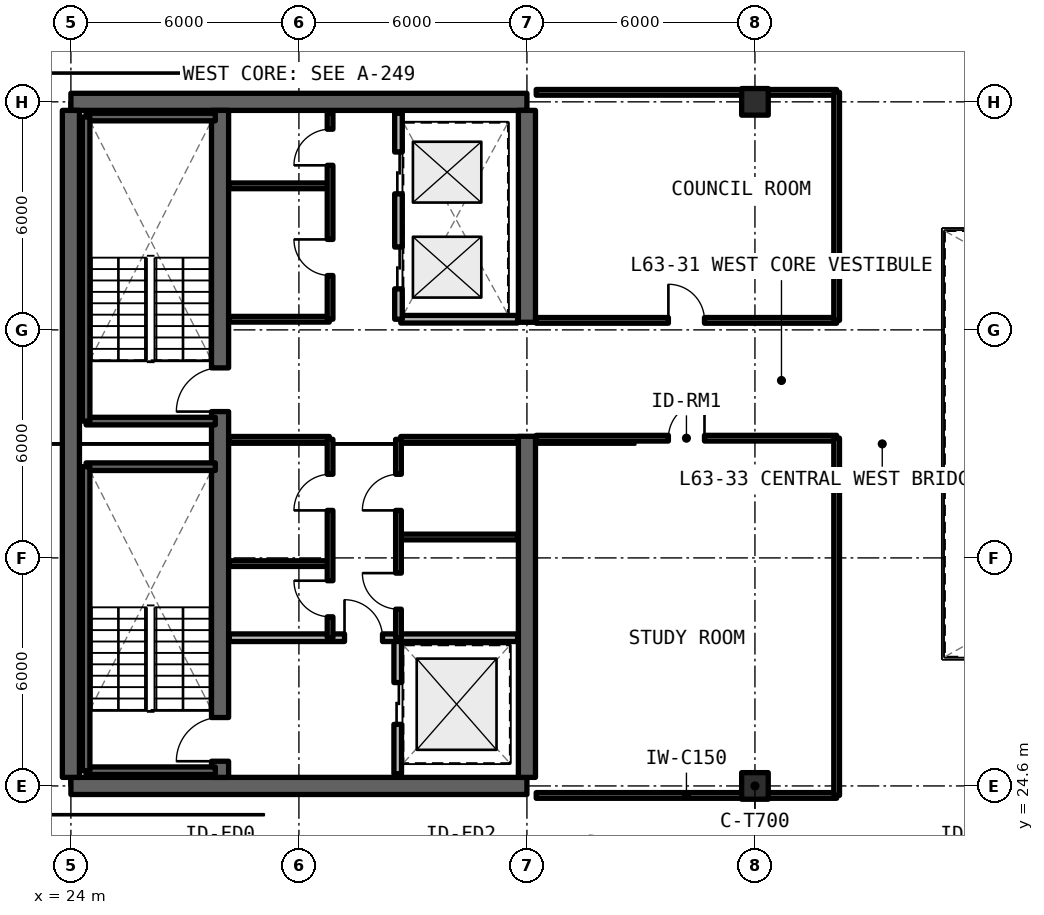
"""IFC4 building model, lengths in metres.
Left out: names, types, materials, properties, quantities, classifications, styles, units other than length and angle.
Written with IfcOpenShell. Run it as: python <this file> out.ifc"""

import sys

from ifc_helpers import new_model, si_unit, direction, frame, frame_2d, origin, origin_2d, place, context, subcontext, project, spatial, rectangle, extrude, element, fill, save


model = new_model("IFC4")
c1 = context("Model", 3, precision=1e-05, world=origin(), true_north=direction((0.0, 1.0)))
c2 = subcontext(c1, "Body", "Model", "MODEL_VIEW")
j1 = project(units=[si_unit("LENGTHUNIT", "METRE"), si_unit("PLANEANGLEUNIT", "RADIAN")], contexts=[c1])
p1 = place(None, origin())
s1 = spatial("IfcSite", under=j1, at=p1, CompositionType="ELEMENT")
p2 = place(p1, origin())
s2 = spatial("IfcBuilding", under=s1, at=p2, CompositionType="ELEMENT")
p3 = place(p2, frame((0.0, 0.0, 226.05)))
s3 = spatial("IfcBuildingStorey", under=s2, at=p3, CompositionType="ELEMENT", Elevation=226.05)
for number, where, z_axis, x_axis in (
    (1, (24.0, 24.6, 0.0), (0.0, 0.0, 1.0), (1.0, 0.0, 0.0)),
    (2, (36.0, 42.6, 0.0), (0.0, 0.0, 1.0), (-1.0, 0.0, 0.0)),
):
    element("IfcWall", number, at=place(p3, frame(where, z_axis=z_axis, x_axis=x_axis)), inside=s3, PredefinedType="SHEAR", context=c2, shape_type="SweptSolid", body=[
        extrude(rectangle(XDim=12.0, YDim=0.45, at=frame_2d((6.0, 0.0))), origin(), (0.0, 0.0, 1.0), 3.3),
    ])
p4 = place(p3, frame((24.0, 24.825, 0.0), z_axis=(0.0, 0.0, 1.0), x_axis=(0.0, 1.0, 0.0)))
e3 = element("IfcWall", 3, at=p4, inside=s3, PredefinedType="SHEAR", context=c2, shape_type="SweptSolid", body=[
    extrude(rectangle(XDim=17.55, YDim=0.45, at=frame_2d((8.775, 0.0))), origin(), (0.0, 0.0, 1.0), 3.3),
])
p5 = place(p3, frame((36.0, 24.825, 0.0), z_axis=(0.0, 0.0, 1.0), x_axis=(0.0, 1.0, 0.0)))
e4 = element("IfcWall", 4, at=p5, inside=s3, PredefinedType="SHEAR", context=c2, shape_type="SweptSolid", body=[
    extrude(rectangle(XDim=8.975, YDim=0.45, at=frame_2d((4.488, 0.0))), origin(), (0.0, 0.0, 1.0), 3.3),
])
p6 = place(p3, frame((36.0, 36.8, 0.0), z_axis=(0.0, 0.0, 1.0), x_axis=(0.0, 1.0, 0.0)))
e5 = element("IfcWall", 5, at=p6, inside=s3, PredefinedType="SHEAR", context=c2, shape_type="SweptSolid", body=[
    extrude(rectangle(XDim=5.575, YDim=0.45, at=frame_2d((2.788, 0.0))), origin(), (0.0, 0.0, 1.0), 3.3),
])
p7 = place(p3, frame((27.925, 24.825, 0.0), z_axis=(0.0, 0.0, 1.0), x_axis=(0.0, 1.0, 0.0)))
e6 = element("IfcWall", 6, at=p7, inside=s3, PredefinedType="SHEAR", context=c2, shape_type="SweptSolid", body=[
    extrude(rectangle(XDim=17.55, YDim=0.45, at=frame_2d((8.775, 0.0))), origin(), (0.0, 0.0, 1.0), 3.3),
])
p8 = place(p7, frame((0.425, 0.0, 0.0)))
e7 = element("IfcOpeningElement", 7, at=p8, cuts=e6, PredefinedType="OPENING", context=c2, shape_type="SweptSolid", body=[
    extrude(rectangle(XDim=1.15, YDim=2.15, at=frame_2d((0.575, 1.075))), frame((0.0, 0.235, 0.0), z_axis=(0.0, -1.0, 0.0), x_axis=(1.0, 0.0, 0.0)), (0.0, 0.0, 1.0), 0.47),
])
p9 = place(p7, frame((9.625, 0.0, 0.0)))
e8 = element("IfcOpeningElement", 8, at=p9, cuts=e6, PredefinedType="OPENING", context=c2, shape_type="SweptSolid", body=[
    extrude(rectangle(XDim=1.15, YDim=2.15, at=frame_2d((0.575, 1.075))), frame((0.0, 0.235, 0.0), z_axis=(0.0, -1.0, 0.0), x_axis=(1.0, 0.0, 0.0)), (0.0, 0.0, 1.0), 0.47),
])
for number, where, z_axis, x_axis in (
    (9, (42.0, 24.6, 0.0), (0.0, 0.0, 1.0), (1.0, 0.0, 0.0)),
    (10, (42.0, 42.6, 0.0), (0.0, 0.0, 1.0), (1.0, 0.0, 0.0)),
):
    element("IfcColumn", number, at=place(p3, frame(where, z_axis=z_axis, x_axis=x_axis)), inside=s3, PredefinedType="COLUMN", context=c2, shape_type="SweptSolid", body=[
        extrude(rectangle(XDim=0.7, YDim=0.7, at=origin_2d()), origin(), (0.0, 0.0, 1.0), 3.02),
    ])
p10 = place(p3, frame((32.6, 24.92, 0.0), z_axis=(0.0, 0.0, 1.0), x_axis=(0.0, 1.0, 0.0)))
e11 = element("IfcWall", 11, at=p10, inside=s3, PredefinedType="SOLIDWALL", context=c2, shape_type="SweptSolid", body=[
    extrude(rectangle(XDim=3.58, YDim=0.2, at=frame_2d((1.79, 0.0))), origin(), (0.0, 0.0, 1.0), 2.35),
])
p11 = place(p10, frame((1.3, 0.0, 0.0)))
e12 = element("IfcOpeningElement", 12, at=p11, cuts=e11, PredefinedType="OPENING", context=c2, shape_type="SweptSolid", body=[
    extrude(rectangle(XDim=1.1, YDim=2.2, at=frame_2d((0.55, 1.1))), frame((0.0, 0.11, 0.0), z_axis=(0.0, -1.0, 0.0), x_axis=(1.0, 0.0, 0.0)), (0.0, 0.0, 1.0), 0.22),
])
p12 = place(p3, frame((28.17, 28.5, 0.0), z_axis=(0.0, 0.0, 1.0), x_axis=(1.0, 0.0, 0.0)))
e13 = element("IfcWall", 13, at=p12, inside=s3, PredefinedType="SOLIDWALL", context=c2, shape_type="SweptSolid", body=[
    extrude(rectangle(XDim=7.585, YDim=0.2, at=frame_2d((3.792, 0.0))), origin(), (0.0, 0.0, 1.0), 2.35),
])
p13 = place(p12, frame((3.03, 0.0, 0.0)))
e14 = element("IfcOpeningElement", 14, at=p13, cuts=e13, PredefinedType="OPENING", context=c2, shape_type="SweptSolid", body=[
    extrude(rectangle(XDim=1.0, YDim=2.15, at=frame_2d((0.5, 1.075))), frame((0.0, 0.11, 0.0), z_axis=(0.0, -1.0, 0.0), x_axis=(1.0, 0.0, 0.0)), (0.0, 0.0, 1.0), 0.22),
])
for number, where, z_axis, x_axis in (
    (15, (28.17, 30.45, 0.0), (0.0, 0.0, 1.0), (1.0, 0.0, 0.0)),
    (16, (28.17, 33.72, 0.0), (0.0, 0.0, 1.0), (1.0, 0.0, 0.0)),
):
    element("IfcWall", number, at=place(p3, frame(where, z_axis=z_axis, x_axis=x_axis)), inside=s3, PredefinedType="SOLIDWALL", context=c2, shape_type="SweptSolid", body=[
        extrude(rectangle(XDim=2.63, YDim=0.15, at=frame_2d((1.315, 0.0))), origin(), (0.0, 0.0, 1.0), 2.35),
    ])
p14 = place(p3, frame((30.82, 28.5, 0.0), z_axis=(0.0, 0.0, 1.0), x_axis=(0.0, 1.0, 0.0)))
e17 = element("IfcWall", 17, at=p14, inside=s3, PredefinedType="SOLIDWALL", context=c2, shape_type="SweptSolid", body=[
    extrude(rectangle(XDim=5.22, YDim=0.15, at=frame_2d((2.61, 0.0))), origin(), (0.0, 0.0, 1.0), 2.35),
])
p15 = place(p14, frame((0.55, 0.0, 0.0)))
e18 = element("IfcOpeningElement", 18, at=p15, cuts=e17, PredefinedType="OPENING", context=c2, shape_type="SweptSolid", body=[
    extrude(rectangle(XDim=0.95, YDim=2.15, at=frame_2d((0.475, 1.075))), frame((0.0, 0.085, 0.0), z_axis=(0.0, -1.0, 0.0), x_axis=(1.0, 0.0, 0.0)), (0.0, 0.0, 1.0), 0.17),
])
p16 = place(p14, frame((3.35, 0.0, 0.0)))
e19 = element("IfcOpeningElement", 19, at=p16, cuts=e17, PredefinedType="OPENING", context=c2, shape_type="SweptSolid", body=[
    extrude(rectangle(XDim=0.95, YDim=2.15, at=frame_2d((0.475, 1.075))), frame((0.0, 0.085, 0.0), z_axis=(0.0, -1.0, 0.0), x_axis=(1.0, 0.0, 0.0)), (0.0, 0.0, 1.0), 0.17),
])
for number, where, z_axis, x_axis in (
    (20, (32.68, 31.15, 0.0), (0.0, 0.0, 1.0), (1.0, 0.0, 0.0)),
    (21, (32.68, 33.72, 0.0), (0.0, 0.0, 1.0), (1.0, 0.0, 0.0)),
):
    element("IfcWall", number, at=place(p3, frame(where, z_axis=z_axis, x_axis=x_axis)), inside=s3, PredefinedType="SOLIDWALL", context=c2, shape_type="SweptSolid", body=[
        extrude(rectangle(XDim=3.075, YDim=0.15, at=frame_2d((1.538, 0.0))), origin(), (0.0, 0.0, 1.0), 2.35),
    ])
p17 = place(p3, frame((32.62, 28.5, 0.0), z_axis=(0.0, 0.0, 1.0), x_axis=(0.0, 1.0, 0.0)))
e22 = element("IfcWall", 22, at=p17, inside=s3, PredefinedType="SOLIDWALL", context=c2, shape_type="SweptSolid", body=[
    extrude(rectangle(XDim=5.22, YDim=0.15, at=frame_2d((2.61, 0.0))), origin(), (0.0, 0.0, 1.0), 2.35),
])
p18 = place(p17, frame((0.75, 0.0, 0.0)))
e23 = element("IfcOpeningElement", 23, at=p18, cuts=e22, PredefinedType="OPENING", context=c2, shape_type="SweptSolid", body=[
    extrude(rectangle(XDim=0.95, YDim=2.15, at=frame_2d((0.475, 1.075))), frame((0.0, 0.085, 0.0), z_axis=(0.0, -1.0, 0.0), x_axis=(1.0, 0.0, 0.0)), (0.0, 0.0, 1.0), 0.17),
])
p19 = place(p17, frame((3.35, 0.0, 0.0)))
e24 = element("IfcOpeningElement", 24, at=p19, cuts=e22, PredefinedType="OPENING", context=c2, shape_type="SweptSolid", body=[
    extrude(rectangle(XDim=0.95, YDim=2.15, at=frame_2d((0.475, 1.075))), frame((0.0, 0.085, 0.0), z_axis=(0.0, -1.0, 0.0), x_axis=(1.0, 0.0, 0.0)), (0.0, 0.0, 1.0), 0.17),
])
for number, where, z_axis, x_axis in (
    (25, (28.17, 36.88, 0.0), (0.0, 0.0, 1.0), (1.0, 0.0, 0.0)),
    (26, (28.17, 40.39, 0.0), (0.0, 0.0, 1.0), (1.0, 0.0, 0.0)),
):
    element("IfcWall", number, at=place(p3, frame(where, z_axis=z_axis, x_axis=x_axis)), inside=s3, PredefinedType="SOLIDWALL", context=c2, shape_type="SweptSolid", body=[
        extrude(rectangle(XDim=2.63, YDim=0.15, at=frame_2d((1.315, 0.0))), origin(), (0.0, 0.0, 1.0), 2.35),
    ])
p20 = place(p3, frame((30.82, 36.88, 0.0), z_axis=(0.0, 0.0, 1.0), x_axis=(0.0, 1.0, 0.0)))
e27 = element("IfcWall", 27, at=p20, inside=s3, PredefinedType="SOLIDWALL", context=c2, shape_type="SweptSolid", body=[
    extrude(rectangle(XDim=5.42, YDim=0.15, at=frame_2d((2.71, 0.0))), origin(), (0.0, 0.0, 1.0), 2.35),
])
p21 = place(p20, frame((1.15, 0.0, 0.0)))
e28 = element("IfcOpeningElement", 28, at=p21, cuts=e27, PredefinedType="OPENING", context=c2, shape_type="SweptSolid", body=[
    extrude(rectangle(XDim=0.95, YDim=2.15, at=frame_2d((0.475, 1.075))), frame((0.0, 0.085, 0.0), z_axis=(0.0, -1.0, 0.0), x_axis=(1.0, 0.0, 0.0)), (0.0, 0.0, 1.0), 0.17),
])
p22 = place(p20, frame((4.05, 0.0, 0.0)))
e29 = element("IfcOpeningElement", 29, at=p22, cuts=e27, PredefinedType="OPENING", context=c2, shape_type="SweptSolid", body=[
    extrude(rectangle(XDim=0.95, YDim=2.15, at=frame_2d((0.475, 1.075))), frame((0.0, 0.085, 0.0), z_axis=(0.0, -1.0, 0.0), x_axis=(1.0, 0.0, 0.0)), (0.0, 0.0, 1.0), 0.17),
])
p23 = place(p3, frame((32.68, 36.88, 0.0), z_axis=(0.0, 0.0, 1.0), x_axis=(1.0, 0.0, 0.0)))
e30 = element("IfcWall", 30, at=p23, inside=s3, PredefinedType="SOLIDWALL", context=c2, shape_type="SweptSolid", body=[
    extrude(rectangle(XDim=3.075, YDim=0.2, at=frame_2d((1.538, 0.0))), origin(), (0.0, 0.0, 1.0), 2.35),
])
p24 = place(p3, frame((32.62, 36.88, 0.0), z_axis=(0.0, 0.0, 1.0), x_axis=(0.0, 1.0, 0.0)))
e31 = element("IfcWall", 31, at=p24, inside=s3, PredefinedType="SOLIDWALL", context=c2, shape_type="SweptSolid", body=[
    extrude(rectangle(XDim=5.42, YDim=0.2, at=frame_2d((2.71, 0.0))), origin(), (0.0, 0.0, 1.0), 2.35),
])
p25 = place(p24, frame((0.8, 0.0, 0.0)))
e32 = element("IfcOpeningElement", 32, at=p25, cuts=e31, PredefinedType="OPENING", context=c2, shape_type="SweptSolid", body=[
    extrude(rectangle(XDim=1.1, YDim=2.2, at=frame_2d((0.55, 1.1))), frame((0.0, 0.11, 0.0), z_axis=(0.0, -1.0, 0.0), x_axis=(1.0, 0.0, 0.0)), (0.0, 0.0, 1.0), 0.22),
])
p26 = place(p24, frame((3.3, 0.0, 0.0)))
e33 = element("IfcOpeningElement", 33, at=p26, cuts=e31, PredefinedType="OPENING", context=c2, shape_type="SweptSolid", body=[
    extrude(rectangle(XDim=1.1, YDim=2.2, at=frame_2d((0.55, 1.1))), frame((0.0, 0.11, 0.0), z_axis=(0.0, -1.0, 0.0), x_axis=(1.0, 0.0, 0.0)), (0.0, 0.0, 1.0), 0.22),
])
p27 = place(p3, frame((36.245, 24.35, 0.0), z_axis=(0.0, 0.0, 1.0), x_axis=(1.0, 0.0, 0.0)))
e34 = element("IfcWall", 34, at=p27, inside=s3, PredefinedType="SOLIDWALL", context=c2, shape_type="SweptSolid", body=[
    extrude(rectangle(XDim=7.905, YDim=0.15, at=frame_2d((3.952, 0.0))), origin(), (0.0, 0.0, 1.0), 2.35),
])
p28 = place(p3, frame((36.245, 33.75, 0.0), z_axis=(0.0, 0.0, 1.0), x_axis=(1.0, 0.0, 0.0)))
e35 = element("IfcWall", 35, at=p28, inside=s3, PredefinedType="SOLIDWALL", context=c2, shape_type="SweptSolid", body=[
    extrude(rectangle(XDim=7.905, YDim=0.15, at=frame_2d((3.952, 0.0))), origin(), (0.0, 0.0, 1.0), 2.35),
])
p29 = place(p28, frame((3.478, 0.0, 0.0)))
e36 = element("IfcOpeningElement", 36, at=p29, cuts=e35, PredefinedType="OPENING", context=c2, shape_type="SweptSolid", body=[
    extrude(rectangle(XDim=0.95, YDim=2.15, at=frame_2d((0.475, 1.075))), frame((0.0, 0.085, 0.0), z_axis=(0.0, -1.0, 0.0), x_axis=(1.0, 0.0, 0.0)), (0.0, 0.0, 1.0), 0.17),
])
p30 = place(p3, frame((44.15, 24.35, 0.0), z_axis=(0.0, 0.0, 1.0), x_axis=(0.0, 1.0, 0.0)))
e37 = element("IfcWall", 37, at=p30, inside=s3, PredefinedType="SOLIDWALL", context=c2, shape_type="SweptSolid", body=[
    extrude(rectangle(XDim=9.4, YDim=0.15, at=frame_2d((4.7, 0.0))), origin(), (0.0, 0.0, 1.0), 2.35),
])
p31 = place(p3, frame((36.245, 36.85, 0.0), z_axis=(0.0, 0.0, 1.0), x_axis=(1.0, 0.0, 0.0)))
e38 = element("IfcWall", 38, at=p31, inside=s3, PredefinedType="SOLIDWALL", context=c2, shape_type="SweptSolid", body=[
    extrude(rectangle(XDim=7.905, YDim=0.15, at=frame_2d((3.952, 0.0))), origin(), (0.0, 0.0, 1.0), 2.35),
])
p32 = place(p31, frame((3.478, 0.0, 0.0)))
e39 = element("IfcOpeningElement", 39, at=p32, cuts=e38, PredefinedType="OPENING", context=c2, shape_type="SweptSolid", body=[
    extrude(rectangle(XDim=0.95, YDim=2.15, at=frame_2d((0.475, 1.075))), frame((0.0, 0.085, 0.0), z_axis=(0.0, -1.0, 0.0), x_axis=(1.0, 0.0, 0.0)), (0.0, 0.0, 1.0), 0.17),
])
p33 = place(p3, frame((36.245, 42.85, 0.0), z_axis=(0.0, 0.0, 1.0), x_axis=(1.0, 0.0, 0.0)))
e40 = element("IfcWall", 40, at=p33, inside=s3, PredefinedType="SOLIDWALL", context=c2, shape_type="SweptSolid", body=[
    extrude(rectangle(XDim=7.905, YDim=0.15, at=frame_2d((3.952, 0.0))), origin(), (0.0, 0.0, 1.0), 2.35),
])
p34 = place(p3, frame((44.15, 36.85, 0.0), z_axis=(0.0, 0.0, 1.0), x_axis=(0.0, 1.0, 0.0)))
e41 = element("IfcWall", 41, at=p34, inside=s3, PredefinedType="SOLIDWALL", context=c2, shape_type="SweptSolid", body=[
    extrude(rectangle(XDim=6.0, YDim=0.15, at=frame_2d((3.0, 0.0))), origin(), (0.0, 0.0, 1.0), 2.35),
])
for number, where, z_axis, x_axis in (
    (42, (24.4, 25.0, 0.0), (0.0, 0.0, 1.0), (1.0, 0.0, 0.0)),
    (43, (27.8, 33.0, 0.0), (0.0, 0.0, 1.0), (-1.0, 0.0, 0.0)),
):
    element("IfcWall", number, at=place(p3, frame(where, z_axis=z_axis, x_axis=x_axis)), inside=s3, PredefinedType="SOLIDWALL", context=c2, shape_type="SweptSolid", body=[
        extrude(rectangle(XDim=3.4, YDim=0.2, at=frame_2d((1.7, 0.0))), origin(), (0.0, 0.0, 1.0), 3.3),
    ])
p35 = place(p3, frame((24.4, 33.0, 0.0), z_axis=(0.0, 0.0, 1.0), x_axis=(0.0, -1.0, 0.0)))
e44 = element("IfcWall", 44, at=p35, inside=s3, PredefinedType="SOLIDWALL", context=c2, shape_type="SweptSolid", body=[
    extrude(rectangle(XDim=8.0, YDim=0.2, at=frame_2d((4.0, 0.0))), origin(), (0.0, 0.0, 1.0), 3.3),
])
for number, where, z_axis, x_axis in (
    (45, (24.4, 34.2, 0.0), (0.0, 0.0, 1.0), (1.0, 0.0, 0.0)),
    (46, (27.8, 42.2, 0.0), (0.0, 0.0, 1.0), (-1.0, 0.0, 0.0)),
):
    element("IfcWall", number, at=place(p3, frame(where, z_axis=z_axis, x_axis=x_axis)), inside=s3, PredefinedType="SOLIDWALL", context=c2, shape_type="SweptSolid", body=[
        extrude(rectangle(XDim=3.4, YDim=0.2, at=frame_2d((1.7, 0.0))), origin(), (0.0, 0.0, 1.0), 3.3),
    ])
p36 = place(p3, frame((24.4, 42.2, 0.0), z_axis=(0.0, 0.0, 1.0), x_axis=(0.0, -1.0, 0.0)))
e47 = element("IfcWall", 47, at=p36, inside=s3, PredefinedType="SOLIDWALL", context=c2, shape_type="SweptSolid", body=[
    extrude(rectangle(XDim=8.0, YDim=0.2, at=frame_2d((4.0, 0.0))), origin(), (0.0, 0.0, 1.0), 3.3),
])
p37 = place(p11, origin())
e48 = element("IfcDoor", 48, at=p37, inside=s3, OperationType="SLIDING_TO_LEFT", PredefinedType="DOOR", context=c2, shape_type="SweptSolid", body=[
    extrude(rectangle(XDim=1.1, YDim=2.2, at=frame_2d((0.55, 1.1))), frame((0.0, 0.025, 0.0), z_axis=(0.0, -1.0, 0.0), x_axis=(1.0, 0.0, 0.0)), (0.0, 0.0, 1.0), 0.05),
])
fill(e12, e48)
p38 = place(p13, origin())
e49 = element("IfcDoor", 49, at=p38, inside=s3, OperationType="SINGLE_SWING_LEFT", PredefinedType="DOOR", context=c2, shape_type="SweptSolid", body=[
    extrude(rectangle(XDim=1.0, YDim=2.15, at=frame_2d((0.5, 1.075))), frame((0.0, 0.025, 0.0), z_axis=(0.0, -1.0, 0.0), x_axis=(1.0, 0.0, 0.0)), (0.0, 0.0, 1.0), 0.05),
])
fill(e14, e49)
p39 = place(p15, origin())
e50 = element("IfcDoor", 50, at=p39, inside=s3, OperationType="SINGLE_SWING_RIGHT", PredefinedType="DOOR", context=c2, shape_type="SweptSolid", body=[
    extrude(rectangle(XDim=0.95, YDim=2.15, at=frame_2d((0.475, 1.075))), frame((0.0, 0.025, 0.0), z_axis=(0.0, -1.0, 0.0), x_axis=(1.0, 0.0, 0.0)), (0.0, 0.0, 1.0), 0.05),
])
fill(e18, e50)
p40 = place(p16, origin())
e51 = element("IfcDoor", 51, at=p40, inside=s3, OperationType="SINGLE_SWING_LEFT", PredefinedType="DOOR", context=c2, shape_type="SweptSolid", body=[
    extrude(rectangle(XDim=0.95, YDim=2.15, at=frame_2d((0.475, 1.075))), frame((0.0, 0.025, 0.0), z_axis=(0.0, -1.0, 0.0), x_axis=(1.0, 0.0, 0.0)), (0.0, 0.0, 1.0), 0.05),
])
fill(e19, e51)
p41 = place(p18, origin())
e52 = element("IfcDoor", 52, at=p41, inside=s3, OperationType="SINGLE_SWING_RIGHT", PredefinedType="DOOR", context=c2, shape_type="SweptSolid", body=[
    extrude(rectangle(XDim=0.95, YDim=2.15, at=frame_2d((0.475, 1.075))), frame((0.0, 0.025, 0.0), z_axis=(0.0, -1.0, 0.0), x_axis=(1.0, 0.0, 0.0)), (0.0, 0.0, 1.0), 0.05),
])
fill(e23, e52)
p42 = place(p19, origin())
e53 = element("IfcDoor", 53, at=p42, inside=s3, OperationType="SINGLE_SWING_LEFT", PredefinedType="DOOR", context=c2, shape_type="SweptSolid", body=[
    extrude(rectangle(XDim=0.95, YDim=2.15, at=frame_2d((0.475, 1.075))), frame((0.0, 0.025, 0.0), z_axis=(0.0, -1.0, 0.0), x_axis=(1.0, 0.0, 0.0)), (0.0, 0.0, 1.0), 0.05),
])
fill(e24, e53)
p43 = place(p21, origin())
e54 = element("IfcDoor", 54, at=p43, inside=s3, OperationType="SINGLE_SWING_RIGHT", PredefinedType="DOOR", context=c2, shape_type="SweptSolid", body=[
    extrude(rectangle(XDim=0.95, YDim=2.15, at=frame_2d((0.475, 1.075))), frame((0.0, 0.025, 0.0), z_axis=(0.0, -1.0, 0.0), x_axis=(1.0, 0.0, 0.0)), (0.0, 0.0, 1.0), 0.05),
])
fill(e28, e54)
p44 = place(p22, origin())
e55 = element("IfcDoor", 55, at=p44, inside=s3, OperationType="SINGLE_SWING_LEFT", PredefinedType="DOOR", context=c2, shape_type="SweptSolid", body=[
    extrude(rectangle(XDim=0.95, YDim=2.15, at=frame_2d((0.475, 1.075))), frame((0.0, 0.025, 0.0), z_axis=(0.0, -1.0, 0.0), x_axis=(1.0, 0.0, 0.0)), (0.0, 0.0, 1.0), 0.05),
])
fill(e29, e55)
p45 = place(p25, origin())
e56 = element("IfcDoor", 56, at=p45, inside=s3, OperationType="SLIDING_TO_LEFT", PredefinedType="DOOR", context=c2, shape_type="SweptSolid", body=[
    extrude(rectangle(XDim=1.1, YDim=2.2, at=frame_2d((0.55, 1.1))), frame((0.0, 0.025, 0.0), z_axis=(0.0, -1.0, 0.0), x_axis=(1.0, 0.0, 0.0)), (0.0, 0.0, 1.0), 0.05),
])
fill(e32, e56)
p46 = place(p26, origin())
e57 = element("IfcDoor", 57, at=p46, inside=s3, OperationType="SLIDING_TO_RIGHT", PredefinedType="DOOR", context=c2, shape_type="SweptSolid", body=[
    extrude(rectangle(XDim=1.1, YDim=2.2, at=frame_2d((0.55, 1.1))), frame((0.0, 0.025, 0.0), z_axis=(0.0, -1.0, 0.0), x_axis=(1.0, 0.0, 0.0)), (0.0, 0.0, 1.0), 0.05),
])
fill(e33, e57)
p47 = place(p29, origin())
e58 = element("IfcDoor", 58, at=p47, inside=s3, OperationType="SINGLE_SWING_RIGHT", PredefinedType="DOOR", context=c2, shape_type="SweptSolid", body=[
    extrude(rectangle(XDim=0.95, YDim=2.15, at=frame_2d((0.475, 1.075))), frame((0.0, 0.025, 0.0), z_axis=(0.0, -1.0, 0.0), x_axis=(1.0, 0.0, 0.0)), (0.0, 0.0, 1.0), 0.05),
])
fill(e36, e58)
p48 = place(p32, origin())
e59 = element("IfcDoor", 59, at=p48, inside=s3, OperationType="SINGLE_SWING_LEFT", PredefinedType="DOOR", context=c2, shape_type="SweptSolid", body=[
    extrude(rectangle(XDim=0.95, YDim=2.15, at=frame_2d((0.475, 1.075))), frame((0.0, 0.025, 0.0), z_axis=(0.0, -1.0, 0.0), x_axis=(1.0, 0.0, 0.0)), (0.0, 0.0, 1.0), 0.05),
])
fill(e39, e59)
p49 = place(p8, origin())
e60 = element("IfcDoor", 60, at=p49, inside=s3, OperationType="SINGLE_SWING_RIGHT", PredefinedType="DOOR", context=c2, shape_type="SweptSolid", body=[
    extrude(rectangle(XDim=1.15, YDim=2.15, at=frame_2d((0.575, 1.075))), frame((0.0, 0.025, 0.0), z_axis=(0.0, -1.0, 0.0), x_axis=(1.0, 0.0, 0.0)), (0.0, 0.0, 1.0), 0.05),
])
fill(e7, e60)
p50 = place(p9, origin())
e61 = element("IfcDoor", 61, at=p50, inside=s3, OperationType="SINGLE_SWING_LEFT", PredefinedType="DOOR", context=c2, shape_type="SweptSolid", body=[
    extrude(rectangle(XDim=1.15, YDim=2.15, at=frame_2d((0.575, 1.075))), frame((0.0, 0.025, 0.0), z_axis=(0.0, -1.0, 0.0), x_axis=(1.0, 0.0, 0.0)), (0.0, 0.0, 1.0), 0.05),
])
fill(e8, e61)
save(model, sys.argv[1])
